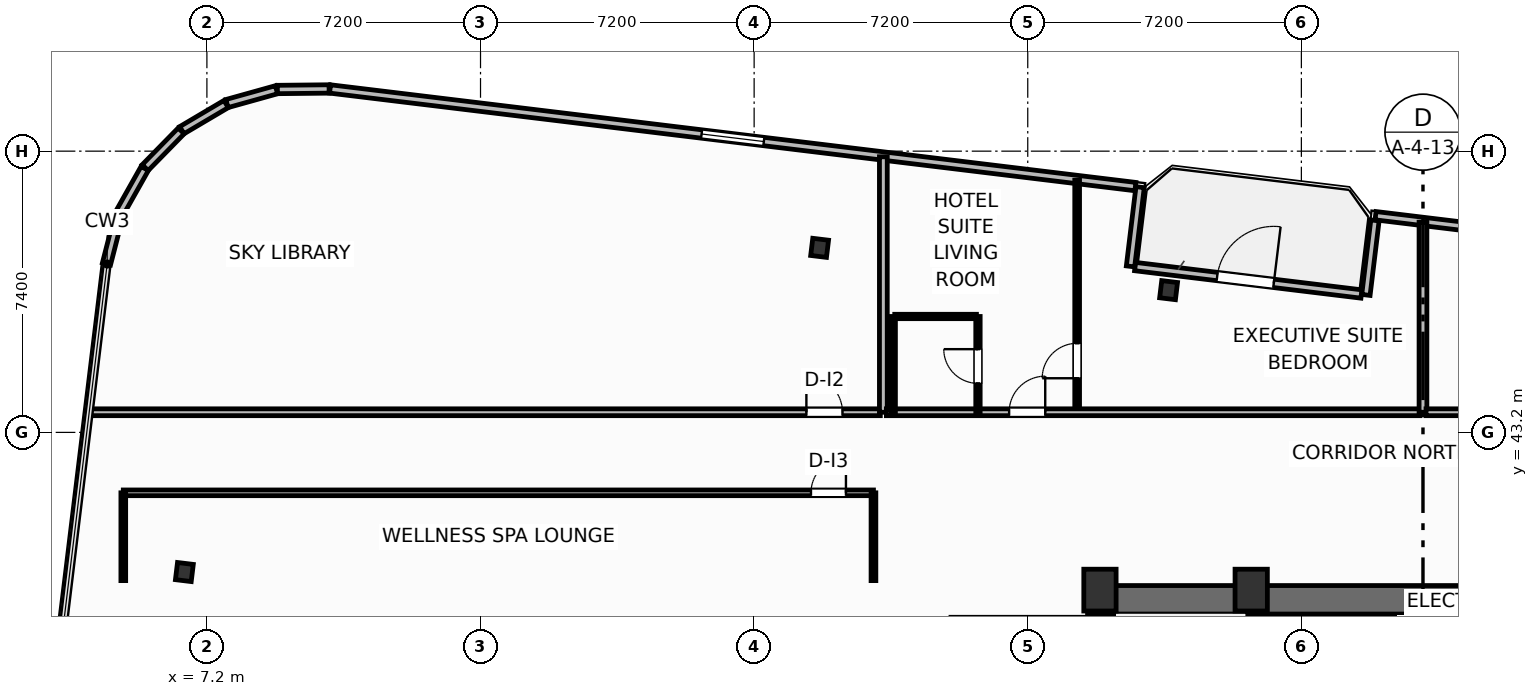
"""IFC4 building model, lengths in metres.
Left out: names, types, materials, properties, quantities, classifications, styles, units other than length and angle.
Written with IfcOpenShell. Run it as: python <this file> out.ifc"""

import sys

from ifc_helpers import new_model, si_unit, direction, frame, frame_2d, origin, origin_2d, place, context, subcontext, project, spatial, rectangle, i_section, extrude, element, fill, save


model = new_model("IFC4")
c1 = context("Model", 3, precision=1e-05, world=origin(), true_north=direction((0.0, 1.0)))
c2 = subcontext(c1, "Body", "Model", "MODEL_VIEW")
j1 = project(units=[si_unit("LENGTHUNIT", "METRE"), si_unit("PLANEANGLEUNIT", "RADIAN")], contexts=[c1])
p1 = place(None, origin())
s1 = spatial("IfcSite", under=j1, at=p1, CompositionType="ELEMENT")
p2 = place(p1, origin())
s2 = spatial("IfcBuilding", under=s1, at=p2, CompositionType="ELEMENT")
p3 = place(p2, frame((0.0, 0.0, 147.6)))
s3 = spatial("IfcBuildingStorey", under=s2, at=p3, CompositionType="ELEMENT", Elevation=147.6)
for number, where, z_axis, x_axis in (
    (1, (30.7, 39.05, 0.0), (0.0, 0.0, 1.0), (1.0, 0.0, 0.0)),
    (2, (34.68, 39.05, 0.0), (0.0, 0.0, 1.0), (1.0, 0.0, 0.0)),
):
    element("IfcColumn", number, at=place(p3, frame(where, z_axis=z_axis, x_axis=x_axis)), inside=s3, PredefinedType="COLUMN", context=c2, shape_type="SweptSolid", body=[
        extrude(rectangle(XDim=0.85, YDim=1.1, at=origin_2d()), origin(), (0.0, 0.0, 1.0), 3.7),
    ])
p4 = place(p3, frame((30.38, 38.795, 0.0), z_axis=(0.0, 0.0, 1.0), x_axis=(1.0, 0.0, 0.0)))
e3 = element("IfcWall", 3, at=p4, inside=s3, PredefinedType="SHEAR", context=c2, shape_type="SweptSolid", body=[
    extrude(rectangle(XDim=17.64, YDim=0.75, at=frame_2d((8.82, 0.0))), origin(), (0.0, 0.0, 1.0), 3.45),
])
p5 = place(p3, frame((30.755, 29.2, 0.0), z_axis=(0.0, 0.0, 1.0), x_axis=(0.0, 1.0, 0.0)))
e4 = element("IfcWall", 4, at=p5, inside=s3, PredefinedType="SHEAR", context=c2, shape_type="SweptSolid", body=[
    extrude(rectangle(XDim=9.22, YDim=0.75, at=frame_2d((4.61, 0.0))), origin(), (0.0, 0.0, 1.0), 3.45),
])
p6 = place(p3, frame((34.64, 29.2, 0.0), z_axis=(0.0, 0.0, 1.0), x_axis=(0.0, 1.0, 0.0)))
e5 = element("IfcWall", 5, at=p6, inside=s3, PredefinedType="SHEAR", context=c2, shape_type="SweptSolid", body=[
    extrude(rectangle(XDim=9.22, YDim=0.25, at=frame_2d((4.61, 0.0))), origin(), (0.0, 0.0, 1.0), 3.45),
])
p7 = place(p6, frame((0.65, 0.0, 0.0)))
e6 = element("IfcOpeningElement", 6, at=p7, cuts=e5, PredefinedType="OPENING", context=c2, shape_type="SweptSolid", body=[
    extrude(rectangle(XDim=1.05, YDim=2.15, at=frame_2d((0.525, 1.075))), frame((0.0, 0.135, 0.0), z_axis=(0.0, -1.0, 0.0), x_axis=(1.0, 0.0, 0.0)), (0.0, 0.0, 1.0), 0.27),
])
for number, where, z_axis, x_axis in (
    (7, (32.506, 46.943, 0.0), (0.0, 0.0, 1.0), (0.993, -0.12, 0.0)),
    (8, (23.323, 48.056, 0.0), (0.0, 0.0, 1.0), (0.993, -0.12, 0.0)),
    (9, (6.607, 39.526, 0.0), (0.0, 0.0, 1.0), (0.993, -0.12, 0.0)),
):
    element("IfcColumn", number, at=place(p3, frame(where, z_axis=z_axis, x_axis=x_axis)), inside=s3, PredefinedType="COLUMN", context=c2, shape_type="SweptSolid", body=[
        extrude(i_section(OverallWidth=0.418, OverallDepth=0.455, WebThickness=0.042, FlangeThickness=0.068, FilletRadius=0.025, at=origin_2d()), origin(), (0.0, 0.0, 1.0), 3.7),
    ])
p8 = place(p3, frame((31.624, 47.563, 0.0), z_axis=(0.0, 0.0, 1.0), x_axis=(0.992729951822, -0.120362962556, 0.0)))
e10 = element("IfcWall", 10, at=p8, inside=s3, PredefinedType="SOLIDWALL", context=c2, shape_type="SweptSolid", body=[
    extrude(rectangle(XDim=6.0, YDim=0.22, at=frame_2d((3.0, 0.0))), origin(), (0.0, 0.0, 1.0), 2.73),
])
p9 = place(p8, frame((2.176, 0.0, 0.0)))
e11 = element("IfcOpeningElement", 11, at=p9, cuts=e10, PredefinedType="OPENING", context=c2, shape_type="SweptSolid", body=[
    extrude(rectangle(XDim=1.5, YDim=2.25, at=frame_2d((0.75, 1.125))), frame((0.0, 0.12, 0.0), z_axis=(0.0, -1.0, 0.0), x_axis=(1.0, 0.0, 0.0)), (0.0, 0.0, 1.0), 0.24),
])
p10 = place(p3, frame((45.928, 47.935, 0.0), z_axis=(0.0, 0.0, 1.0), x_axis=(-0.992730591876, 0.120357683402, 0.0)))
e12 = element("IfcWall", 12, at=p10, inside=s3, PredefinedType="SOLIDWALL", context=c2, shape_type="SweptSolid", body=[
    extrude(rectangle(XDim=8.035, YDim=0.22, at=frame_2d((4.017, 0.0))), origin(), (0.0, 0.0, 1.0), 2.73),
])
p11 = place(p10, frame((3.192, 0.0, 0.8)))
e13 = element("IfcOpeningElement", 13, at=p11, cuts=e12, PredefinedType="OPENING", context=c2, shape_type="SweptSolid", body=[
    extrude(rectangle(XDim=1.65, YDim=1.65, at=frame_2d((0.825, 0.825))), frame((0.0, 0.12, 0.0), z_axis=(0.0, -1.0, 0.0), x_axis=(1.0, 0.0, 0.0)), (0.0, 0.0, 1.0), 0.24),
])
p12 = place(p3, frame((37.936, 48.778, 0.0), z_axis=(0.0, 0.0, 1.0), x_axis=(-0.120397815541, -0.992725725472, 0.0)))
e14 = element("IfcWall", 14, at=p12, inside=s3, PredefinedType="SOLIDWALL", context=c2, shape_type="SweptSolid", body=[
    extrude(rectangle(XDim=1.975, YDim=0.22, at=frame_2d((0.988, 0.0))), origin(), (0.0, 0.0, 1.0), 2.73),
])
p13 = place(p3, frame((31.504, 47.568, 0.0), z_axis=(0.0, 0.0, 1.0), x_axis=(0.120341784665, 0.992732519294, 0.0)))
e15 = element("IfcWall", 15, at=p13, inside=s3, PredefinedType="SOLIDWALL", context=c2, shape_type="SweptSolid", body=[
    extrude(rectangle(XDim=2.1, YDim=0.22, at=frame_2d((1.05, 0.0))), origin(), (0.0, 0.0, 1.0), 2.73),
])
p14 = place(p3, frame((31.633, 49.668, 0.0), z_axis=(0.0, 0.0, 1.0), x_axis=(-0.992731670483, 0.120348786531, 0.0)))
e16 = element("IfcWall", 16, at=p14, inside=s3, PredefinedType="SOLIDWALL", context=c2, shape_type="SweptSolid", body=[
    extrude(rectangle(XDim=21.347, YDim=0.22, at=frame_2d((10.674, 0.0))), origin(), (0.0, 0.0, 1.0), 2.73),
])
p15 = place(p14, frame((9.849, 0.0, 0.8)))
e17 = element("IfcOpeningElement", 17, at=p15, cuts=e16, PredefinedType="OPENING", context=c2, shape_type="SweptSolid", body=[
    extrude(rectangle(XDim=1.65, YDim=1.65, at=frame_2d((0.825, 0.825))), frame((0.0, 0.12, 0.0), z_axis=(0.0, -1.0, 0.0), x_axis=(1.0, 0.0, 0.0)), (0.0, 0.0, 1.0), 0.24),
])
p16 = place(p3, frame((10.416, 52.237, 0.0), z_axis=(0.0, 0.0, 1.0), x_axis=(-0.999947718056, -0.010225514878, 0.0)))
e18 = element("IfcWall", 18, at=p16, inside=s3, PredefinedType="SOLIDWALL", context=c2, shape_type="SweptSolid", body=[
    extrude(rectangle(XDim=1.361, YDim=0.22, at=frame_2d((0.68, 0.0))), origin(), (0.0, 0.0, 1.0), 2.73),
])
for number, where, z_axis, x_axis in (
    (19, (9.031, 52.216, 0.0), (0.0, 0.0, 1.0), (-0.963, -0.269, 0.0)),
    (20, (7.706, 51.84, 0.0), (0.0, 0.0, 1.0), (-0.861, -0.509, 0.0)),
):
    element("IfcWall", number, at=place(p3, frame(where, z_axis=z_axis, x_axis=x_axis)), inside=s3, PredefinedType="SOLIDWALL", context=c2, shape_type="SweptSolid", body=[
        extrude(rectangle(XDim=1.353, YDim=0.22, at=frame_2d((0.677, 0.0))), origin(), (0.0, 0.0, 1.0), 2.73),
    ])
p17 = place(p3, frame((6.523, 51.133, 0.0), z_axis=(0.0, 0.0, 1.0), x_axis=(-0.699762925925, -0.714375144795, 0.0)))
e21 = element("IfcWall", 21, at=p17, inside=s3, PredefinedType="SOLIDWALL", context=c2, shape_type="SweptSolid", body=[
    extrude(rectangle(XDim=1.353, YDim=0.22, at=frame_2d((0.677, 0.0))), origin(), (0.0, 0.0, 1.0), 2.73),
])
p18 = place(p3, frame((5.564, 50.145, 0.0), z_axis=(0.0, 0.0, 1.0), x_axis=(-0.491117621399, -0.871093268227, 0.0)))
e22 = element("IfcWall", 22, at=p18, inside=s3, PredefinedType="SOLIDWALL", context=c2, shape_type="SweptSolid", body=[
    extrude(rectangle(XDim=1.353, YDim=0.22, at=frame_2d((0.677, 0.0))), origin(), (0.0, 0.0, 1.0), 2.73),
])
p19 = place(p3, frame((4.894, 48.942, 0.0), z_axis=(0.0, 0.0, 1.0), x_axis=(-0.248857256909, -0.968540172468, 0.0)))
e23 = element("IfcWall", 23, at=p19, inside=s3, PredefinedType="SOLIDWALL", context=c2, shape_type="SweptSolid", body=[
    extrude(rectangle(XDim=1.353, YDim=0.22, at=frame_2d((0.676, 0.0))), origin(), (0.0, 0.0, 1.0), 2.73),
])
p20 = place(p3, frame((5.0, 41.61, 0.0), z_axis=(0.0, 0.0, 1.0), x_axis=(1.0, 0.0, 0.0)))
e24 = element("IfcWall", 24, at=p20, inside=s3, PredefinedType="PARTITIONING", context=c2, shape_type="SweptSolid", body=[
    extrude(rectangle(XDim=19.74, YDim=0.15, at=frame_2d((9.87, 0.0))), origin(), (0.0, 0.0, 1.0), 3.45),
])
p21 = place(p20, frame((18.096, 0.0, 0.0)))
e25 = element("IfcOpeningElement", 25, at=p21, cuts=e24, PredefinedType="OPENING", context=c2, shape_type="SweptSolid", body=[
    extrude(rectangle(XDim=0.92, YDim=2.05, at=frame_2d((0.46, 1.025))), frame((0.0, 0.085, 0.0), z_axis=(0.0, -1.0, 0.0), x_axis=(1.0, 0.0, 0.0)), (0.0, 0.0, 1.0), 0.17),
])
for number, where, z_axis, x_axis in (
    (26, (5.0, 39.3, 0.0), (0.0, 0.0, 1.0), (0.0, 1.0, 0.0)),
    (27, (24.74, 39.3, 0.0), (0.0, 0.0, 1.0), (0.0, 1.0, 0.0)),
):
    element("IfcWall", number, at=place(p3, frame(where, z_axis=z_axis, x_axis=x_axis)), inside=s3, PredefinedType="PARTITIONING", context=c2, shape_type="SweptSolid", body=[
        extrude(rectangle(XDim=2.31, YDim=0.125, at=frame_2d((1.155, 0.0))), origin(), (0.0, 0.0, 1.0), 3.45),
    ])
p22 = place(p3, frame((4.143, 43.73, 0.0), z_axis=(0.0, 0.0, 1.0), x_axis=(1.0, 0.0, 0.0)))
e28 = element("IfcWall", 28, at=p22, inside=s3, PredefinedType="PARTITIONING", context=c2, shape_type="SweptSolid", body=[
    extrude(rectangle(XDim=20.777, YDim=0.18, at=frame_2d((10.389, 0.0))), origin(), (0.0, 0.0, 1.0), 3.45),
])
p23 = place(p22, frame((18.832, 0.0, 0.0)))
e29 = element("IfcOpeningElement", 29, at=p23, cuts=e28, PredefinedType="OPENING", context=c2, shape_type="SweptSolid", body=[
    extrude(rectangle(XDim=0.95, YDim=2.05, at=frame_2d((0.475, 1.025))), frame((0.0, 0.1, 0.0), z_axis=(0.0, -1.0, 0.0), x_axis=(1.0, 0.0, 0.0)), (0.0, 0.0, 1.0), 0.2),
])
p24 = place(p3, frame((25.0, 43.73, 0.0), z_axis=(0.0, 0.0, 1.0), x_axis=(0.0, 1.0, 0.0)))
e30 = element("IfcWall", 30, at=p24, inside=s3, PredefinedType="PARTITIONING", context=c2, shape_type="SweptSolid", body=[
    extrude(rectangle(XDim=6.722, YDim=0.205, at=frame_2d((3.361, 0.0))), origin(), (0.0, 0.0, 1.0), 3.45),
])
p25 = place(p3, frame((30.1, 43.73, 0.0), z_axis=(0.0, 0.0, 1.0), x_axis=(0.0, 1.0, 0.0)))
e31 = element("IfcWall", 31, at=p25, inside=s3, PredefinedType="PARTITIONING", context=c2, shape_type="SweptSolid", body=[
    extrude(rectangle(XDim=6.104, YDim=0.125, at=frame_2d((3.052, 0.0))), origin(), (0.0, 0.0, 1.0), 3.45),
])
p26 = place(p25, frame((0.895, 0.0, 0.0)))
e32 = element("IfcOpeningElement", 32, at=p26, cuts=e31, PredefinedType="OPENING", context=c2, shape_type="SweptSolid", body=[
    extrude(rectangle(XDim=0.92, YDim=2.05, at=frame_2d((0.46, 1.025))), frame((0.0, 0.073, 0.0), z_axis=(0.0, -1.0, 0.0), x_axis=(1.0, 0.0, 0.0)), (0.0, 0.0, 1.0), 0.145),
])
p27 = place(p3, frame((25.08, 43.73, 0.0), z_axis=(0.0, 0.0, 1.0), x_axis=(1.0, 0.0, 0.0)))
e33 = element("IfcWall", 33, at=p27, inside=s3, PredefinedType="PARTITIONING", context=c2, shape_type="SweptSolid", body=[
    extrude(rectangle(XDim=14.04, YDim=0.18, at=frame_2d((7.02, 0.0))), origin(), (0.0, 0.0, 1.0), 2.972),
])
p28 = place(p27, frame((3.23, 0.0, 0.0)))
e34 = element("IfcOpeningElement", 34, at=p28, cuts=e33, PredefinedType="OPENING", context=c2, shape_type="SweptSolid", body=[
    extrude(rectangle(XDim=0.95, YDim=2.15, at=frame_2d((0.475, 1.075))), frame((0.0, 0.1, 0.0), z_axis=(0.0, -1.0, 0.0), x_axis=(1.0, 0.0, 0.0)), (0.0, 0.0, 1.0), 0.2),
])
p29 = place(p3, frame((25.3, 46.25, 0.0), z_axis=(0.0, 0.0, 1.0), x_axis=(1.0, 0.0, 0.0)))
e35 = element("IfcWall", 35, at=p29, inside=s3, PredefinedType="PARTITIONING", context=c2, shape_type="SweptSolid", body=[
    extrude(rectangle(XDim=2.15, YDim=0.115, at=frame_2d((1.075, 0.0))), origin(), (0.0, 0.0, 1.0), 3.45),
])
p30 = place(p3, frame((27.49, 43.73, 0.0), z_axis=(0.0, 0.0, 1.0), x_axis=(0.0, 1.0, 0.0)))
e36 = element("IfcWall", 36, at=p30, inside=s3, PredefinedType="PARTITIONING", context=c2, shape_type="SweptSolid", body=[
    extrude(rectangle(XDim=2.52, YDim=0.115, at=frame_2d((1.26, 0.0))), origin(), (0.0, 0.0, 1.0), 3.45),
])
p31 = place(p30, frame((0.76, 0.0, 0.0)))
e37 = element("IfcOpeningElement", 37, at=p31, cuts=e36, PredefinedType="OPENING", context=c2, shape_type="SweptSolid", body=[
    extrude(rectangle(XDim=0.9, YDim=2.05, at=frame_2d((0.45, 1.025))), frame((0.0, 0.067, 0.0), z_axis=(0.0, -1.0, 0.0), x_axis=(1.0, 0.0, 0.0)), (0.0, 0.0, 1.0), 0.135),
])
p32 = place(p3, frame((25.26, 43.73, 0.0), z_axis=(0.0, 0.0, 1.0), x_axis=(0.0, 1.0, 0.0)))
e38 = element("IfcWall", 38, at=p32, inside=s3, PredefinedType="PARTITIONING", context=c2, shape_type="SweptSolid", body=[
    extrude(rectangle(XDim=2.52, YDim=0.115, at=frame_2d((1.26, 0.0))), origin(), (0.0, 0.0, 1.0), 3.45),
])
p33 = place(p3, frame((39.2, 43.73, 0.0), z_axis=(0.0, 0.0, 1.0), x_axis=(0.0, 1.0, 0.0)))
e39 = element("IfcWall", 39, at=p33, inside=s3, PredefinedType="PARTITIONING", context=c2, shape_type="SweptSolid", body=[
    extrude(rectangle(XDim=5.0, YDim=0.205, at=frame_2d((2.5, 0.0))), origin(), (0.0, 0.0, 1.0), 3.45),
])
p34 = place(p3, frame((39.28, 43.73, 0.0), z_axis=(0.0, 0.0, 1.0), x_axis=(1.0, 0.0, 0.0)))
e40 = element("IfcWall", 40, at=p34, inside=s3, PredefinedType="PARTITIONING", context=c2, shape_type="SweptSolid", body=[
    extrude(rectangle(XDim=12.64, YDim=0.18, at=frame_2d((6.32, 0.0))), origin(), (0.0, 0.0, 1.0), 2.972),
])
p35 = place(p34, frame((5.845, 0.0, 0.0)))
e41 = element("IfcOpeningElement", 41, at=p35, cuts=e40, PredefinedType="OPENING", context=c2, shape_type="SweptSolid", body=[
    extrude(rectangle(XDim=0.95, YDim=2.05, at=frame_2d((0.475, 1.025))), frame((0.0, 0.1, 0.0), z_axis=(0.0, -1.0, 0.0), x_axis=(1.0, 0.0, 0.0)), (0.0, 0.0, 1.0), 0.2),
])
p36 = place(p9, origin())
e42 = element("IfcDoor", 42, at=p36, inside=s3, OperationType="SINGLE_SWING_RIGHT", PredefinedType="DOOR", context=c2, shape_type="SweptSolid", body=[
    extrude(rectangle(XDim=1.5, YDim=2.25, at=frame_2d((0.75, 1.125))), frame((0.0, 0.025, 0.0), z_axis=(0.0, -1.0, 0.0), x_axis=(1.0, 0.0, 0.0)), (0.0, 0.0, 1.0), 0.05),
])
fill(e11, e42)
p37 = place(p15, origin())
e43 = element("IfcWindow", 43, at=p37, inside=s3, PartitioningType="SINGLE_PANEL", PredefinedType="WINDOW", context=c2, shape_type="SweptSolid", body=[
    extrude(rectangle(XDim=1.65, YDim=1.65, at=frame_2d((0.825, 0.825))), frame((0.0, 0.03, 0.0), z_axis=(0.0, -1.0, 0.0), x_axis=(1.0, 0.0, 0.0)), (0.0, 0.0, 1.0), 0.06),
])
fill(e17, e43)
p38 = place(p21, origin())
e44 = element("IfcDoor", 44, at=p38, inside=s3, OperationType="SINGLE_SWING_RIGHT", PredefinedType="DOOR", context=c2, shape_type="SweptSolid", body=[
    extrude(rectangle(XDim=0.92, YDim=2.05, at=frame_2d((0.46, 1.025))), frame((0.0, 0.025, 0.0), z_axis=(0.0, -1.0, 0.0), x_axis=(1.0, 0.0, 0.0)), (0.0, 0.0, 1.0), 0.05),
])
fill(e25, e44)
p39 = place(p23, origin())
e45 = element("IfcDoor", 45, at=p39, inside=s3, OperationType="SINGLE_SWING_LEFT", PredefinedType="DOOR", context=c2, shape_type="SweptSolid", body=[
    extrude(rectangle(XDim=0.95, YDim=2.05, at=frame_2d((0.475, 1.025))), frame((0.0, 0.025, 0.0), z_axis=(0.0, -1.0, 0.0), x_axis=(1.0, 0.0, 0.0)), (0.0, 0.0, 1.0), 0.05),
])
fill(e29, e45)
p40 = place(p26, origin())
e46 = element("IfcDoor", 46, at=p40, inside=s3, OperationType="SINGLE_SWING_LEFT", PredefinedType="DOOR", context=c2, shape_type="SweptSolid", body=[
    extrude(rectangle(XDim=0.92, YDim=2.05, at=frame_2d((0.46, 1.025))), frame((0.0, 0.025, 0.0), z_axis=(0.0, -1.0, 0.0), x_axis=(1.0, 0.0, 0.0)), (0.0, 0.0, 1.0), 0.05),
])
fill(e32, e46)
p41 = place(p28, origin())
e47 = element("IfcDoor", 47, at=p41, inside=s3, OperationType="SINGLE_SWING_RIGHT", PredefinedType="DOOR", context=c2, shape_type="SweptSolid", body=[
    extrude(rectangle(XDim=0.95, YDim=2.15, at=frame_2d((0.475, 1.075))), frame((0.0, 0.025, 0.0), z_axis=(0.0, -1.0, 0.0), x_axis=(1.0, 0.0, 0.0)), (0.0, 0.0, 1.0), 0.05),
])
fill(e34, e47)
p42 = place(p31, origin())
e48 = element("IfcDoor", 48, at=p42, inside=s3, OperationType="SINGLE_SWING_RIGHT", PredefinedType="DOOR", context=c2, shape_type="SweptSolid", body=[
    extrude(rectangle(XDim=0.9, YDim=2.05, at=frame_2d((0.45, 1.025))), frame((0.0, 0.025, 0.0), z_axis=(0.0, -1.0, 0.0), x_axis=(1.0, 0.0, 0.0)), (0.0, 0.0, 1.0), 0.05),
])
fill(e37, e48)
save(model, sys.argv[1])
